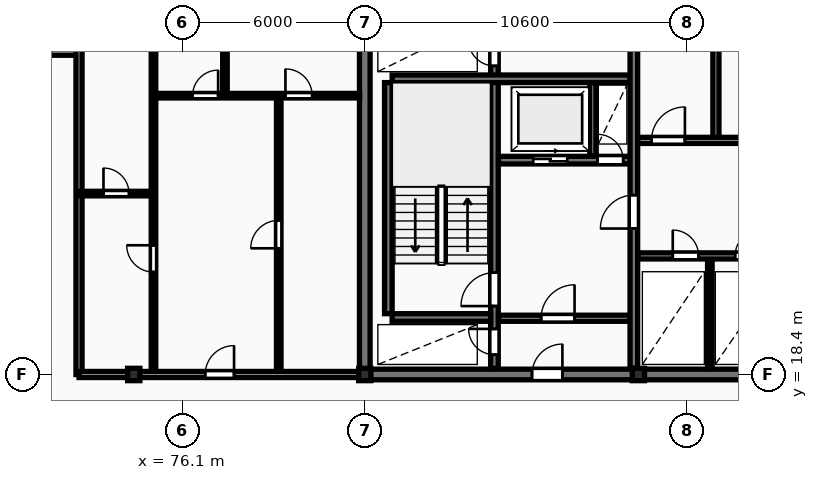
"""IFC4 building model, lengths in metres.
Left out: names, types, materials, properties, quantities, classifications, styles, units other than length and angle.
Written with IfcOpenShell. Run it as: python <this file> out.ifc"""

import sys

from ifc_helpers import new_model, si_unit, direction, frame, frame_2d, origin, origin_2d, place, context, subcontext, project, spatial, rectangle, i_section, extrude, element, fill, save


model = new_model("IFC4")
c1 = context("Model", 3, precision=1e-05, world=origin(), true_north=direction((0.0, 1.0)))
c2 = subcontext(c1, "Body", "Model", "MODEL_VIEW")
j1 = project(units=[si_unit("LENGTHUNIT", "METRE"), si_unit("PLANEANGLEUNIT", "RADIAN")], contexts=[c1])
p1 = place(None, origin())
s1 = spatial("IfcSite", under=j1, at=p1, CompositionType="ELEMENT")
p2 = place(p1, origin())
s2 = spatial("IfcBuilding", under=s1, at=p2, CompositionType="ELEMENT")
p3 = place(p2, frame((0.0, 0.0, 153.7)))
s3 = spatial("IfcBuildingStorey", under=s2, at=p3, CompositionType="ELEMENT", Elevation=153.7)
for number, where, z_axis, x_axis in (
    (1, (74.5, 18.4, 0.0), (0.0, 0.0, 1.0), (1.0, 0.0, 0.0)),
    (2, (82.1, 18.4, 0.0), (0.0, 0.0, 1.0), (1.0, 0.0, 0.0)),
    (3, (91.1, 18.4, 0.0), (0.0, 0.0, 1.0), (1.0, 0.0, 0.0)),
):
    element("IfcColumn", number, at=place(p3, frame(where, z_axis=z_axis, x_axis=x_axis)), inside=s3, PredefinedType="COLUMN", context=c2, shape_type="SweptSolid", body=[
        extrude(i_section(OverallWidth=0.403, OverallDepth=0.406, WebThickness=0.027, FlangeThickness=0.043, FilletRadius=0.015, at=origin_2d()), origin(), (0.0, 0.0, 1.0), 3.6),
    ])
p4 = place(p3, frame((72.7, 29.05, 0.0), z_axis=(0.0, 0.0, 1.0), x_axis=(-1.0, 0.0, 0.0)))
e4 = element("IfcWall", 4, at=p4, inside=s3, PredefinedType="STANDARD", context=c2, shape_type="SweptSolid", body=[
    extrude(rectangle(XDim=3.6, YDim=0.3, at=frame_2d((1.8, 0.0))), origin(), (0.0, 0.0, 1.0), 3.32),
])
p5 = place(p3, frame((82.1, 18.575, 0.0), z_axis=(0.0, 0.0, 1.0), x_axis=(0.0, 1.0, 0.0)))
e5 = element("IfcWall", 5, at=p5, inside=s3, PredefinedType="SHEAR", context=c2, shape_type="SweptSolid", body=[
    extrude(rectangle(XDim=11.65, YDim=0.35, at=frame_2d((5.825, 0.0))), origin(), (0.0, 0.0, 1.0), 3.6),
])
p6 = place(p3, frame((81.925, 18.4, 0.0), z_axis=(0.0, 0.0, 1.0), x_axis=(1.0, 0.0, 0.0)))
e6 = element("IfcWall", 6, at=p6, inside=s3, PredefinedType="SHEAR", context=c2, shape_type="SweptSolid", body=[
    extrude(rectangle(XDim=36.265, YDim=0.35, at=frame_2d((18.132, 0.0))), origin(), (0.0, 0.0, 1.0), 3.6),
])
p7 = place(p6, frame((5.675, 0.0, 0.0)))
e7 = element("IfcOpeningElement", 7, at=p7, cuts=e6, PredefinedType="OPENING", context=c2, shape_type="SweptSolid", body=[
    extrude(rectangle(XDim=1.0, YDim=2.15, at=frame_2d((0.5, 1.075))), frame((0.0, 0.185, 0.0), z_axis=(0.0, -1.0, 0.0), x_axis=(1.0, 0.0, 0.0)), (0.0, 0.0, 1.0), 0.37),
])
p8 = place(p6, frame((21.925, 0.0, 0.0)))
e8 = element("IfcOpeningElement", 8, at=p8, cuts=e6, PredefinedType="OPENING", context=c2, shape_type="SweptSolid", body=[
    extrude(rectangle(XDim=1.5, YDim=2.2, at=frame_2d((0.75, 1.1))), frame((0.0, 0.185, 0.0), z_axis=(0.0, -1.0, 0.0), x_axis=(1.0, 0.0, 0.0)), (0.0, 0.0, 1.0), 0.37),
])
p9 = place(p6, frame((29.875, 0.0, 0.0)))
e9 = element("IfcOpeningElement", 9, at=p9, cuts=e6, PredefinedType="OPENING", context=c2, shape_type="SweptSolid", body=[
    extrude(rectangle(XDim=1.0, YDim=2.15, at=frame_2d((0.5, 1.075))), frame((0.0, 0.185, 0.0), z_axis=(0.0, -1.0, 0.0), x_axis=(1.0, 0.0, 0.0)), (0.0, 0.0, 1.0), 0.37),
])
p10 = place(p3, frame((82.875, 20.4, 0.0), z_axis=(0.0, 0.0, 1.0), x_axis=(0.0, 1.0, 0.0)))
e10 = element("IfcWall", 10, at=p10, inside=s3, PredefinedType="SHEAR", context=c2, shape_type="SweptSolid", body=[
    extrude(rectangle(XDim=7.6, YDim=0.25, at=frame_2d((3.8, 0.0))), origin(), (0.0, 0.0, 1.0), 3.6),
])
p11 = place(p3, frame((86.365, 18.6, 0.0), z_axis=(0.0, 0.0, 1.0), x_axis=(0.0, 1.0, 0.0)))
e11 = element("IfcWall", 11, at=p11, inside=s3, PredefinedType="SHEAR", context=c2, shape_type="SweptSolid", body=[
    extrude(rectangle(XDim=11.6, YDim=0.25, at=frame_2d((5.8, 0.0))), origin(), (0.0, 0.0, 1.0), 3.6),
])
p12 = place(p11, frame((0.45, 0.0, 0.0)))
e12 = element("IfcOpeningElement", 12, at=p12, cuts=e11, PredefinedType="OPENING", context=c2, shape_type="SweptSolid", body=[
    extrude(rectangle(XDim=0.85, YDim=2.05, at=frame_2d((0.425, 1.025))), frame((0.0, 0.135, 0.0), z_axis=(0.0, -1.0, 0.0), x_axis=(1.0, 0.0, 0.0)), (0.0, 0.0, 1.0), 0.27),
])
p13 = place(p11, frame((2.05, 0.0, 0.0)))
e13 = element("IfcOpeningElement", 13, at=p13, cuts=e11, PredefinedType="OPENING", context=c2, shape_type="SweptSolid", body=[
    extrude(rectangle(XDim=1.1, YDim=2.1, at=frame_2d((0.55, 1.05))), frame((0.0, 0.135, 0.0), z_axis=(0.0, -1.0, 0.0), x_axis=(1.0, 0.0, 0.0)), (0.0, 0.0, 1.0), 0.27),
])
p14 = place(p11, frame((9.95, 0.0, 0.0)))
e14 = element("IfcOpeningElement", 14, at=p14, cuts=e11, PredefinedType="OPENING", context=c2, shape_type="SweptSolid", body=[
    extrude(rectangle(XDim=0.85, YDim=2.05, at=frame_2d((0.425, 1.025))), frame((0.0, 0.135, 0.0), z_axis=(0.0, -1.0, 0.0), x_axis=(1.0, 0.0, 0.0)), (0.0, 0.0, 1.0), 0.27),
])
p15 = place(p3, frame((83.0, 20.275, 0.0), z_axis=(0.0, 0.0, 1.0), x_axis=(1.0, 0.0, 0.0)))
e15 = element("IfcWall", 15, at=p15, inside=s3, PredefinedType="SHEAR", context=c2, shape_type="SweptSolid", body=[
    extrude(rectangle(XDim=3.24, YDim=0.25, at=frame_2d((1.62, 0.0))), origin(), (0.0, 0.0, 1.0), 3.6),
])
p16 = place(p3, frame((83.0, 28.125, 0.0), z_axis=(0.0, 0.0, 1.0), x_axis=(1.0, 0.0, 0.0)))
e16 = element("IfcWall", 16, at=p16, inside=s3, PredefinedType="SHEAR", context=c2, shape_type="SweptSolid", body=[
    extrude(rectangle(XDim=7.82, YDim=0.25, at=frame_2d((3.91, 0.0))), origin(), (0.0, 0.0, 1.0), 3.6),
])
p17 = place(p3, frame((86.5, 25.45, 0.0), z_axis=(0.0, 0.0, 1.0), x_axis=(1.0, 0.0, 0.0)))
e17 = element("IfcWall", 17, at=p17, inside=s3, PredefinedType="SHEAR", context=c2, shape_type="SweptSolid", body=[
    extrude(rectangle(XDim=4.32, YDim=0.25, at=frame_2d((2.16, 0.0))), origin(), (0.0, 0.0, 1.0), 3.6),
])
p18 = place(p17, frame((1.14, 0.0, 0.0)))
e18 = element("IfcOpeningElement", 18, at=p18, cuts=e17, PredefinedType="OPENING", context=c2, shape_type="SweptSolid", body=[
    extrude(rectangle(XDim=1.12, YDim=2.12, at=frame_2d((0.56, 1.06))), frame((0.0, 0.135, 0.0), z_axis=(0.0, -1.0, 0.0), x_axis=(1.0, 0.0, 0.0)), (0.0, 0.0, 1.0), 0.27),
])
p19 = place(p17, frame((3.25, 0.0, 0.0)))
e19 = element("IfcOpeningElement", 19, at=p19, cuts=e17, PredefinedType="OPENING", context=c2, shape_type="SweptSolid", body=[
    extrude(rectangle(XDim=0.85, YDim=2.05, at=frame_2d((0.425, 1.025))), frame((0.0, 0.135, 0.0), z_axis=(0.0, -1.0, 0.0), x_axis=(1.0, 0.0, 0.0)), (0.0, 0.0, 1.0), 0.27),
])
p20 = place(p3, frame((89.6, 25.58, 0.0), z_axis=(0.0, 0.0, 1.0), x_axis=(0.0, 1.0, 0.0)))
e20 = element("IfcWall", 20, at=p20, inside=s3, PredefinedType="PARTITIONING", context=c2, shape_type="SweptSolid", body=[
    extrude(rectangle(XDim=2.42, YDim=0.2, at=frame_2d((1.21, 0.0))), origin(), (0.0, 0.0, 1.0), 3.32),
])
p21 = place(p3, frame((86.5, 20.25, 0.0), z_axis=(0.0, 0.0, 1.0), x_axis=(1.0, 0.0, 0.0)))
e21 = element("IfcWall", 21, at=p21, inside=s3, PredefinedType="PARTITIONING", context=c2, shape_type="SweptSolid", body=[
    extrude(rectangle(XDim=4.32, YDim=0.2, at=frame_2d((2.16, 0.0))), origin(), (0.0, 0.0, 1.0), 3.32),
])
p22 = place(p21, frame((1.4, 0.0, 0.0)))
e22 = element("IfcOpeningElement", 22, at=p22, cuts=e21, PredefinedType="OPENING", context=c2, shape_type="SweptSolid", body=[
    extrude(rectangle(XDim=1.1, YDim=2.1, at=frame_2d((0.55, 1.05))), frame((0.0, 0.11, 0.0), z_axis=(0.0, -1.0, 0.0), x_axis=(1.0, 0.0, 0.0)), (0.0, 0.0, 1.0), 0.22),
])
p23 = place(p3, frame((90.95, 18.6, 0.0), z_axis=(0.0, 0.0, 1.0), x_axis=(0.0, 1.0, 0.0)))
e23 = element("IfcWall", 23, at=p23, inside=s3, PredefinedType="SHEAR", context=c2, shape_type="SweptSolid", body=[
    extrude(rectangle(XDim=11.6, YDim=0.25, at=frame_2d((5.8, 0.0))), origin(), (0.0, 0.0, 1.0), 3.6),
])
p24 = place(p23, frame((4.6, 0.0, 0.0)))
e24 = element("IfcOpeningElement", 24, at=p24, cuts=e23, PredefinedType="OPENING", context=c2, shape_type="SweptSolid", body=[
    extrude(rectangle(XDim=1.1, YDim=2.1, at=frame_2d((0.55, 1.05))), frame((0.0, 0.135, 0.0), z_axis=(0.0, -1.0, 0.0), x_axis=(1.0, 0.0, 0.0)), (0.0, 0.0, 1.0), 0.27),
])
p25 = place(p3, frame((93.65, 26.1, 0.0), z_axis=(0.0, 0.0, 1.0), x_axis=(0.0, 1.0, 0.0)))
e25 = element("IfcWall", 25, at=p25, inside=s3, PredefinedType="PARTITIONING", context=c2, shape_type="SweptSolid", body=[
    extrude(rectangle(XDim=4.1, YDim=0.2, at=frame_2d((2.05, 0.0))), origin(), (0.0, 0.0, 1.0), 3.32),
])
p26 = place(p3, frame((91.08, 26.1, 0.0), z_axis=(0.0, 0.0, 1.0), x_axis=(1.0, 0.0, 0.0)))
e26 = element("IfcWall", 26, at=p26, inside=s3, PredefinedType="PARTITIONING", context=c2, shape_type="SweptSolid", body=[
    extrude(rectangle(XDim=8.34, YDim=0.2, at=frame_2d((4.17, 0.0))), origin(), (0.0, 0.0, 1.0), 3.32),
])
p27 = place(p26, frame((0.45, 0.0, 0.0)))
e27 = element("IfcOpeningElement", 27, at=p27, cuts=e26, PredefinedType="OPENING", context=c2, shape_type="SweptSolid", body=[
    extrude(rectangle(XDim=1.1, YDim=2.1, at=frame_2d((0.55, 1.05))), frame((0.0, 0.11, 0.0), z_axis=(0.0, -1.0, 0.0), x_axis=(1.0, 0.0, 0.0)), (0.0, 0.0, 1.0), 0.22),
])
p28 = place(p26, frame((4.6, 0.0, 0.0)))
e28 = element("IfcOpeningElement", 28, at=p28, cuts=e26, PredefinedType="OPENING", context=c2, shape_type="SweptSolid", body=[
    extrude(rectangle(XDim=0.92, YDim=2.08, at=frame_2d((0.46, 1.04))), frame((0.0, 0.11, 0.0), z_axis=(0.0, -1.0, 0.0), x_axis=(1.0, 0.0, 0.0)), (0.0, 0.0, 1.0), 0.22),
])
p29 = place(p3, frame((93.45, 18.6, 0.0), z_axis=(0.0, 0.0, 1.0), x_axis=(0.0, 1.0, 0.0)))
e29 = element("IfcWall", 29, at=p29, inside=s3, PredefinedType="PARTITIONING", context=c2, shape_type="SweptSolid", body=[
    extrude(rectangle(XDim=3.6, YDim=0.15, at=frame_2d((1.8, 0.0))), origin(), (0.0, 0.0, 1.0), 3.32),
])
p30 = place(p3, frame((91.08, 22.3, 0.0), z_axis=(0.0, 0.0, 1.0), x_axis=(1.0, 0.0, 0.0)))
e30 = element("IfcWall", 30, at=p30, inside=s3, PredefinedType="PARTITIONING", context=c2, shape_type="SweptSolid", body=[
    extrude(rectangle(XDim=19.14, YDim=0.2, at=frame_2d((9.57, 0.0))), origin(), (0.0, 0.0, 1.0), 3.32),
])
p31 = place(p30, frame((1.15, 0.0, 0.0)))
e31 = element("IfcOpeningElement", 31, at=p31, cuts=e30, PredefinedType="OPENING", context=c2, shape_type="SweptSolid", body=[
    extrude(rectangle(XDim=0.85, YDim=2.05, at=frame_2d((0.425, 1.025))), frame((0.0, 0.11, 0.0), z_axis=(0.0, -1.0, 0.0), x_axis=(1.0, 0.0, 0.0)), (0.0, 0.0, 1.0), 0.22),
])
p32 = place(p30, frame((3.2, 0.0, 0.0)))
e32 = element("IfcOpeningElement", 32, at=p32, cuts=e30, PredefinedType="OPENING", context=c2, shape_type="SweptSolid", body=[
    extrude(rectangle(XDim=0.85, YDim=2.05, at=frame_2d((0.425, 1.025))), frame((0.0, 0.11, 0.0), z_axis=(0.0, -1.0, 0.0), x_axis=(1.0, 0.0, 0.0)), (0.0, 0.0, 1.0), 0.22),
])
p33 = place(p30, frame((12.72, 0.0, 0.0)))
e33 = element("IfcOpeningElement", 33, at=p33, cuts=e30, PredefinedType="OPENING", context=c2, shape_type="SweptSolid", body=[
    extrude(rectangle(XDim=1.5, YDim=2.2, at=frame_2d((0.75, 1.1))), frame((0.0, 0.11, 0.0), z_axis=(0.0, -1.0, 0.0), x_axis=(1.0, 0.0, 0.0)), (0.0, 0.0, 1.0), 0.22),
])
p34 = place(p30, frame((6.42, 0.0, 0.0)))
e34 = element("IfcOpeningElement", 34, at=p34, cuts=e30, PredefinedType="OPENING", context=c2, shape_type="SweptSolid", body=[
    extrude(rectangle(XDim=0.92, YDim=2.08, at=frame_2d((0.46, 1.04))), frame((0.0, 0.11, 0.0), z_axis=(0.0, -1.0, 0.0), x_axis=(1.0, 0.0, 0.0)), (0.0, 0.0, 1.0), 0.22),
])
p35 = place(p30, frame((15.87, 0.0, 0.0)))
e35 = element("IfcOpeningElement", 35, at=p35, cuts=e30, PredefinedType="OPENING", context=c2, shape_type="SweptSolid", body=[
    extrude(rectangle(XDim=0.92, YDim=2.08, at=frame_2d((0.46, 1.04))), frame((0.0, 0.11, 0.0), z_axis=(0.0, -1.0, 0.0), x_axis=(1.0, 0.0, 0.0)), (0.0, 0.0, 1.0), 0.22),
])
p36 = place(p3, frame((72.7, 18.4, 0.0), z_axis=(0.0, 0.0, 1.0), x_axis=(0.0, 1.0, 0.0)))
e36 = element("IfcWall", 36, at=p36, inside=s3, PredefinedType="PARTITIONING", context=c2, shape_type="SweptSolid", body=[
    extrude(rectangle(XDim=14.1, YDim=0.2, at=frame_2d((7.05, 0.0))), origin(), (0.0, 0.0, 1.0), 3.32),
])
p37 = place(p3, frame((72.7, 24.35, 0.0), z_axis=(0.0, 0.0, 1.0), x_axis=(1.0, 0.0, 0.0)))
e37 = element("IfcWall", 37, at=p37, inside=s3, PredefinedType="PARTITIONING", context=c2, shape_type="SweptSolid", body=[
    extrude(rectangle(XDim=2.45, YDim=0.15, at=frame_2d((1.225, 0.0))), origin(), (0.0, 0.0, 1.0), 3.32),
])
p38 = place(p37, frame((0.805, 0.0, 0.0)))
e38 = element("IfcOpeningElement", 38, at=p38, cuts=e37, PredefinedType="OPENING", context=c2, shape_type="SweptSolid", body=[
    extrude(rectangle(XDim=0.84, YDim=2.04, at=frame_2d((0.42, 1.02))), frame((0.0, 0.085, 0.0), z_axis=(0.0, -1.0, 0.0), x_axis=(1.0, 0.0, 0.0)), (0.0, 0.0, 1.0), 0.17),
])
p39 = place(p3, frame((75.15, 18.45, 0.0), z_axis=(0.0, 0.0, 1.0), x_axis=(0.0, 1.0, 0.0)))
e39 = element("IfcWall", 39, at=p39, inside=s3, PredefinedType="PARTITIONING", context=c2, shape_type="SweptSolid", body=[
    extrude(rectangle(XDim=14.05, YDim=0.15, at=frame_2d((7.025, 0.0))), origin(), (0.0, 0.0, 1.0), 3.32),
])
p40 = place(p39, frame((3.32, 0.0, 0.0)))
e40 = element("IfcOpeningElement", 40, at=p40, cuts=e39, PredefinedType="OPENING", context=c2, shape_type="SweptSolid", body=[
    extrude(rectangle(XDim=0.88, YDim=2.06, at=frame_2d((0.44, 1.03))), frame((0.0, 0.085, 0.0), z_axis=(0.0, -1.0, 0.0), x_axis=(1.0, 0.0, 0.0)), (0.0, 0.0, 1.0), 0.17),
])
p41 = place(p3, frame((79.27, 18.45, 0.0), z_axis=(0.0, 0.0, 1.0), x_axis=(0.0, 1.0, 0.0)))
e41 = element("IfcWall", 41, at=p41, inside=s3, PredefinedType="PARTITIONING", context=c2, shape_type="SweptSolid", body=[
    extrude(rectangle(XDim=9.12, YDim=0.15, at=frame_2d((4.56, 0.0))), origin(), (0.0, 0.0, 1.0), 3.32),
])
p42 = place(p41, frame((4.1, 0.0, 0.0)))
e42 = element("IfcOpeningElement", 42, at=p42, cuts=e41, PredefinedType="OPENING", context=c2, shape_type="SweptSolid", body=[
    extrude(rectangle(XDim=0.92, YDim=2.08, at=frame_2d((0.46, 1.04))), frame((0.0, 0.085, 0.0), z_axis=(0.0, -1.0, 0.0), x_axis=(1.0, 0.0, 0.0)), (0.0, 0.0, 1.0), 0.17),
])
p43 = place(p3, frame((77.5, 27.57, 0.0), z_axis=(0.0, 0.0, 1.0), x_axis=(0.0, 1.0, 0.0)))
e43 = element("IfcWall", 43, at=p43, inside=s3, PredefinedType="PARTITIONING", context=c2, shape_type="SweptSolid", body=[
    extrude(rectangle(XDim=4.93, YDim=0.15, at=frame_2d((2.465, 0.0))), origin(), (0.0, 0.0, 1.0), 3.32),
])
p44 = place(p3, frame((75.17, 27.57, 0.0), z_axis=(0.0, 0.0, 1.0), x_axis=(1.0, 0.0, 0.0)))
e44 = element("IfcWall", 44, at=p44, inside=s3, PredefinedType="PARTITIONING", context=c2, shape_type="SweptSolid", body=[
    extrude(rectangle(XDim=6.76, YDim=0.15, at=frame_2d((3.38, 0.0))), origin(), (0.0, 0.0, 1.0), 3.32),
])
p45 = place(p44, frame((1.266, 0.0, 0.0)))
e45 = element("IfcOpeningElement", 45, at=p45, cuts=e44, PredefinedType="OPENING", context=c2, shape_type="SweptSolid", body=[
    extrude(rectangle(XDim=0.84, YDim=2.04, at=frame_2d((0.42, 1.02))), frame((0.0, 0.085, 0.0), z_axis=(0.0, -1.0, 0.0), x_axis=(1.0, 0.0, 0.0)), (0.0, 0.0, 1.0), 0.17),
])
p46 = place(p44, frame((4.32, 0.0, 0.0)))
e46 = element("IfcOpeningElement", 46, at=p46, cuts=e44, PredefinedType="OPENING", context=c2, shape_type="SweptSolid", body=[
    extrude(rectangle(XDim=0.88, YDim=2.06, at=frame_2d((0.44, 1.03))), frame((0.0, 0.085, 0.0), z_axis=(0.0, -1.0, 0.0), x_axis=(1.0, 0.0, 0.0)), (0.0, 0.0, 1.0), 0.17),
])
p47 = place(p3, frame((72.7, 18.4, 0.0), z_axis=(0.0, 0.0, 1.0), x_axis=(1.0, 0.0, 0.0)))
e47 = element("IfcWall", 47, at=p47, inside=s3, PredefinedType="PARTITIONING", context=c2, shape_type="SweptSolid", body=[
    extrude(rectangle(XDim=9.25, YDim=0.2, at=frame_2d((4.625, 0.0))), origin(), (0.0, 0.0, 1.0), 2.708),
])
p48 = place(p47, frame((4.15, 0.0, 0.0)))
e48 = element("IfcOpeningElement", 48, at=p48, cuts=e47, PredefinedType="OPENING", context=c2, shape_type="SweptSolid", body=[
    extrude(rectangle(XDim=0.95, YDim=2.15, at=frame_2d((0.475, 1.075))), frame((0.0, 0.11, 0.0), z_axis=(0.0, -1.0, 0.0), x_axis=(1.0, 0.0, 0.0)), (0.0, 0.0, 1.0), 0.22),
])
p49 = place(p7, origin())
e49 = element("IfcDoor", 49, at=p49, inside=s3, OperationType="SINGLE_SWING_RIGHT", PredefinedType="DOOR", context=c2, shape_type="SweptSolid", body=[
    extrude(rectangle(XDim=1.0, YDim=2.15, at=frame_2d((0.5, 1.075))), frame((0.0, 0.025, 0.0), z_axis=(0.0, -1.0, 0.0), x_axis=(1.0, 0.0, 0.0)), (0.0, 0.0, 1.0), 0.05),
])
fill(e7, e49)
p50 = place(p12, origin())
e50 = element("IfcDoor", 50, at=p50, inside=s3, OperationType="SINGLE_SWING_RIGHT", PredefinedType="DOOR", context=c2, shape_type="SweptSolid", body=[
    extrude(rectangle(XDim=0.85, YDim=2.05, at=frame_2d((0.425, 1.025))), frame((0.0, 0.025, 0.0), z_axis=(0.0, -1.0, 0.0), x_axis=(1.0, 0.0, 0.0)), (0.0, 0.0, 1.0), 0.05),
])
fill(e12, e50)
p51 = place(p13, origin())
e51 = element("IfcDoor", 51, at=p51, inside=s3, OperationType="SINGLE_SWING_LEFT", PredefinedType="DOOR", context=c2, shape_type="SweptSolid", body=[
    extrude(rectangle(XDim=1.1, YDim=2.1, at=frame_2d((0.55, 1.05))), frame((0.0, 0.025, 0.0), z_axis=(0.0, -1.0, 0.0), x_axis=(1.0, 0.0, 0.0)), (0.0, 0.0, 1.0), 0.05),
])
fill(e13, e51)
p52 = place(p14, origin())
e52 = element("IfcDoor", 52, at=p52, inside=s3, OperationType="SINGLE_SWING_RIGHT", PredefinedType="DOOR", context=c2, shape_type="SweptSolid", body=[
    extrude(rectangle(XDim=0.85, YDim=2.05, at=frame_2d((0.425, 1.025))), frame((0.0, 0.025, 0.0), z_axis=(0.0, -1.0, 0.0), x_axis=(1.0, 0.0, 0.0)), (0.0, 0.0, 1.0), 0.05),
])
fill(e14, e52)
p53 = place(p18, origin())
e53 = element("IfcDoor", 53, at=p53, inside=s3, OperationType="SLIDING_TO_RIGHT", PredefinedType="DOOR", context=c2, shape_type="SweptSolid", body=[
    extrude(rectangle(XDim=1.12, YDim=2.12, at=frame_2d((0.56, 1.06))), frame((0.0, 0.025, 0.0), z_axis=(0.0, -1.0, 0.0), x_axis=(1.0, 0.0, 0.0)), (0.0, 0.0, 1.0), 0.05),
])
fill(e18, e53)
p54 = place(p19, origin())
e54 = element("IfcDoor", 54, at=p54, inside=s3, OperationType="SINGLE_SWING_LEFT", PredefinedType="DOOR", context=c2, shape_type="SweptSolid", body=[
    extrude(rectangle(XDim=0.85, YDim=2.05, at=frame_2d((0.425, 1.025))), frame((0.0, 0.025, 0.0), z_axis=(0.0, -1.0, 0.0), x_axis=(1.0, 0.0, 0.0)), (0.0, 0.0, 1.0), 0.05),
])
fill(e19, e54)
p55 = place(p22, origin())
e55 = element("IfcDoor", 55, at=p55, inside=s3, OperationType="SINGLE_SWING_RIGHT", PredefinedType="DOOR", context=c2, shape_type="SweptSolid", body=[
    extrude(rectangle(XDim=1.1, YDim=2.1, at=frame_2d((0.55, 1.05))), frame((0.0, 0.025, 0.0), z_axis=(0.0, -1.0, 0.0), x_axis=(1.0, 0.0, 0.0)), (0.0, 0.0, 1.0), 0.05),
])
fill(e22, e55)
p56 = place(p24, origin())
e56 = element("IfcDoor", 56, at=p56, inside=s3, OperationType="SINGLE_SWING_LEFT", PredefinedType="DOOR", context=c2, shape_type="SweptSolid", body=[
    extrude(rectangle(XDim=1.1, YDim=2.1, at=frame_2d((0.55, 1.05))), frame((0.0, 0.025, 0.0), z_axis=(0.0, -1.0, 0.0), x_axis=(1.0, 0.0, 0.0)), (0.0, 0.0, 1.0), 0.05),
])
fill(e24, e56)
p57 = place(p27, origin())
e57 = element("IfcDoor", 57, at=p57, inside=s3, OperationType="SINGLE_SWING_RIGHT", PredefinedType="DOOR", context=c2, shape_type="SweptSolid", body=[
    extrude(rectangle(XDim=1.1, YDim=2.1, at=frame_2d((0.55, 1.05))), frame((0.0, 0.025, 0.0), z_axis=(0.0, -1.0, 0.0), x_axis=(1.0, 0.0, 0.0)), (0.0, 0.0, 1.0), 0.05),
])
fill(e27, e57)
p58 = place(p31, origin())
e58 = element("IfcDoor", 58, at=p58, inside=s3, OperationType="SINGLE_SWING_LEFT", PredefinedType="DOOR", context=c2, shape_type="SweptSolid", body=[
    extrude(rectangle(XDim=0.85, YDim=2.05, at=frame_2d((0.425, 1.025))), frame((0.0, 0.025, 0.0), z_axis=(0.0, -1.0, 0.0), x_axis=(1.0, 0.0, 0.0)), (0.0, 0.0, 1.0), 0.05),
])
fill(e31, e58)
p59 = place(p32, origin())
e59 = element("IfcDoor", 59, at=p59, inside=s3, OperationType="SINGLE_SWING_RIGHT", PredefinedType="DOOR", context=c2, shape_type="SweptSolid", body=[
    extrude(rectangle(XDim=0.85, YDim=2.05, at=frame_2d((0.425, 1.025))), frame((0.0, 0.025, 0.0), z_axis=(0.0, -1.0, 0.0), x_axis=(1.0, 0.0, 0.0)), (0.0, 0.0, 1.0), 0.05),
])
fill(e32, e59)
p60 = place(p38, origin())
e60 = element("IfcDoor", 60, at=p60, inside=s3, OperationType="SINGLE_SWING_LEFT", PredefinedType="DOOR", context=c2, shape_type="SweptSolid", body=[
    extrude(rectangle(XDim=0.84, YDim=2.04, at=frame_2d((0.42, 1.02))), frame((0.0, 0.025, 0.0), z_axis=(0.0, -1.0, 0.0), x_axis=(1.0, 0.0, 0.0)), (0.0, 0.0, 1.0), 0.05),
])
fill(e38, e60)
p61 = place(p40, origin())
e61 = element("IfcDoor", 61, at=p61, inside=s3, OperationType="SINGLE_SWING_RIGHT", PredefinedType="DOOR", context=c2, shape_type="SweptSolid", body=[
    extrude(rectangle(XDim=0.88, YDim=2.06, at=frame_2d((0.44, 1.03))), frame((0.0, 0.025, 0.0), z_axis=(0.0, -1.0, 0.0), x_axis=(1.0, 0.0, 0.0)), (0.0, 0.0, 1.0), 0.05),
])
fill(e40, e61)
p62 = place(p42, origin())
e62 = element("IfcDoor", 62, at=p62, inside=s3, OperationType="SINGLE_SWING_LEFT", PredefinedType="DOOR", context=c2, shape_type="SweptSolid", body=[
    extrude(rectangle(XDim=0.92, YDim=2.08, at=frame_2d((0.46, 1.04))), frame((0.0, 0.025, 0.0), z_axis=(0.0, -1.0, 0.0), x_axis=(1.0, 0.0, 0.0)), (0.0, 0.0, 1.0), 0.05),
])
fill(e42, e62)
p63 = place(p45, origin())
e63 = element("IfcDoor", 63, at=p63, inside=s3, OperationType="SINGLE_SWING_RIGHT", PredefinedType="DOOR", context=c2, shape_type="SweptSolid", body=[
    extrude(rectangle(XDim=0.84, YDim=2.04, at=frame_2d((0.42, 1.02))), frame((0.0, 0.025, 0.0), z_axis=(0.0, -1.0, 0.0), x_axis=(1.0, 0.0, 0.0)), (0.0, 0.0, 1.0), 0.05),
])
fill(e45, e63)
p64 = place(p46, origin())
e64 = element("IfcDoor", 64, at=p64, inside=s3, OperationType="SINGLE_SWING_LEFT", PredefinedType="DOOR", context=c2, shape_type="SweptSolid", body=[
    extrude(rectangle(XDim=0.88, YDim=2.06, at=frame_2d((0.44, 1.03))), frame((0.0, 0.025, 0.0), z_axis=(0.0, -1.0, 0.0), x_axis=(1.0, 0.0, 0.0)), (0.0, 0.0, 1.0), 0.05),
])
fill(e46, e64)
p65 = place(p48, origin())
e65 = element("IfcDoor", 65, at=p65, inside=s3, OperationType="SINGLE_SWING_RIGHT", PredefinedType="DOOR", context=c2, shape_type="SweptSolid", body=[
    extrude(rectangle(XDim=0.95, YDim=2.15, at=frame_2d((0.475, 1.075))), frame((0.0, 0.025, 0.0), z_axis=(0.0, -1.0, 0.0), x_axis=(1.0, 0.0, 0.0)), (0.0, 0.0, 1.0), 0.05),
])
fill(e48, e65)
save(model, sys.argv[1])
